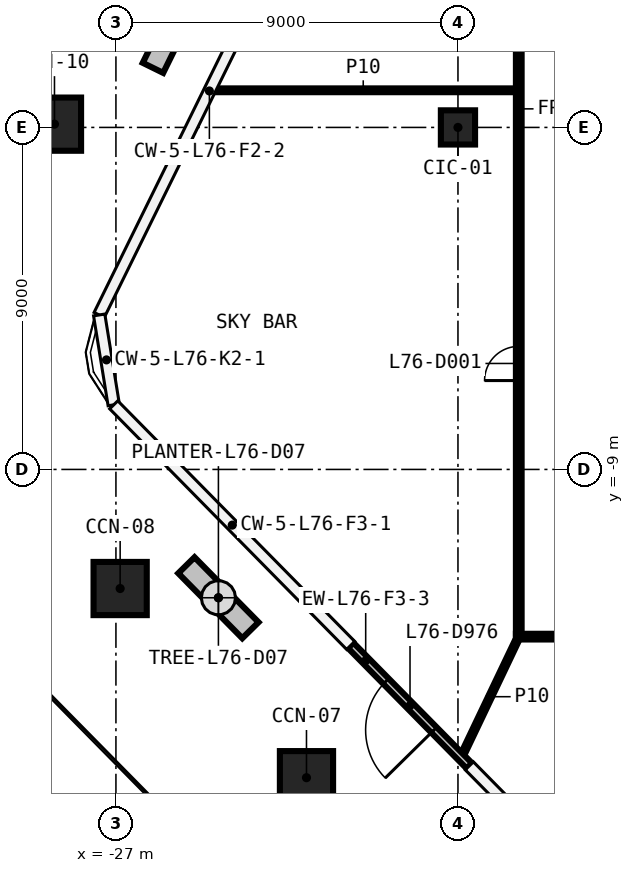
"""IFC4 building model, lengths in metres.
Left out: names, types, materials, properties, quantities, classifications, styles, units other than length and angle.
Written with IfcOpenShell. Run it as: python <this file> out.ifc"""

import sys

from ifc_helpers import new_model, si_unit, direction, frame, frame_2d, origin, origin_2d, place, context, subcontext, project, spatial, rectangle, hollow_rectangle, extrude, element, fill, save


model = new_model("IFC4")
c1 = context("Model", 3, precision=1e-05, world=origin(), true_north=direction((0.0, 1.0)))
c2 = subcontext(c1, "Body", "Model", "MODEL_VIEW")
j1 = project(units=[si_unit("LENGTHUNIT", "METRE"), si_unit("PLANEANGLEUNIT", "RADIAN")], contexts=[c1])
p1 = place(None, origin())
s1 = spatial("IfcSite", under=j1, at=p1, CompositionType="ELEMENT")
p2 = place(p1, origin())
s2 = spatial("IfcBuilding", under=s1, at=p2, CompositionType="ELEMENT")
p3 = place(p2, frame((0.0, 0.0, 353.0)))
s3 = spatial("IfcBuildingStorey", under=s2, at=p3, CompositionType="ELEMENT", Elevation=353.0)
p4 = place(p3, frame((-18.0, 0.0, 0.0), z_axis=(0.0, 0.0, 1.0), x_axis=(1.0, 0.0, 0.0)))
e1 = element("IfcColumn", 1, at=p4, inside=s3, PredefinedType="COLUMN", context=c2, shape_type="SweptSolid", body=[
    extrude(rectangle(XDim=0.9, YDim=0.9, at=origin_2d()), origin(), (0.0, 0.0, 1.0), 5.6),
])
for number, where, z_axis, x_axis in (
    (2, (-26.889, -12.134, 0.0), (0.0, 0.0, 1.0), (1.0, 0.0, 0.0)),
    (3, (-21.986, -17.112, 0.0), (0.0, 0.0, 1.0), (1.0, 0.0, 0.0)),
    (4, (-28.617, 0.086, 0.0), (0.0, 0.0, 1.0), (1.0, 0.0, 0.0)),
):
    element("IfcColumn", number, at=place(p3, frame(where, z_axis=z_axis, x_axis=x_axis)), inside=s3, PredefinedType="COLUMN", context=c2, shape_type="SweptSolid", body=[
        extrude(hollow_rectangle(XDim=1.4, YDim=1.4, WallThickness=0.06, at=origin_2d()), origin(), (0.0, 0.0, 1.0), 6.0),
    ])
p5 = place(p3, frame((16.475, -13.4, 0.0), z_axis=(0.0, 0.0, 1.0), x_axis=(-1.0, 0.0, 0.0)))
e5 = element("IfcWall", 5, at=p5, inside=s3, PredefinedType="PARTITIONING", context=c2, shape_type="SweptSolid", body=[
    extrude(rectangle(XDim=32.95, YDim=0.15, at=frame_2d((16.475, 0.0))), origin(), (0.0, 0.0, 1.0), 5.6),
])
p6 = place(p5, frame((16.809, 0.0, 0.0)))
e6 = element("IfcOpeningElement", 6, at=p6, cuts=e5, PredefinedType="OPENING", context=c2, shape_type="SweptSolid", body=[
    extrude(rectangle(XDim=0.9, YDim=2.1, at=frame_2d((0.45, 1.05))), frame((0.0, 0.085, 0.0), z_axis=(0.0, -1.0, 0.0), x_axis=(1.0, 0.0, 0.0)), (0.0, 0.0, 1.0), 0.17),
])
p7 = place(p5, frame((1.542, 0.0, 0.0)))
e7 = element("IfcOpeningElement", 7, at=p7, cuts=e5, PredefinedType="OPENING", context=c2, shape_type="SweptSolid", body=[
    extrude(rectangle(XDim=0.9, YDim=2.1, at=frame_2d((0.45, 1.05))), frame((0.0, 0.085, 0.0), z_axis=(0.0, -1.0, 0.0), x_axis=(1.0, 0.0, 0.0)), (0.0, 0.0, 1.0), 0.17),
])
p8 = place(p3, frame((-24.51, 0.977, 0.0), z_axis=(0.0, 0.0, 1.0), x_axis=(1.0, 0.0, 0.0)))
e8 = element("IfcWall", 8, at=p8, inside=s3, PredefinedType="PARTITIONING", context=c2, shape_type="SweptSolid", body=[
    extrude(rectangle(XDim=8.035, YDim=0.1, at=frame_2d((4.018, 0.0))), origin(), (0.0, 0.0, 1.0), 5.6),
])
p9 = place(p3, frame((-17.908, -16.561, 0.0), z_axis=(0.0, 0.0, 1.0), x_axis=(0.430658615436, 0.902514906775, 0.0)))
e9 = element("IfcWall", 9, at=p9, inside=s3, PredefinedType="PARTITIONING", context=c2, shape_type="SweptSolid", body=[
    extrude(rectangle(XDim=3.502, YDim=0.1, at=frame_2d((1.751, 0.0))), origin(), (0.0, 0.0, 1.0), 5.6),
])
p10 = place(p3, frame((-16.4, -13.325, 0.0), z_axis=(0.0, 0.0, 1.0), x_axis=(0.0, 1.0, 0.0)))
e10 = element("IfcWall", 10, at=p10, inside=s3, PredefinedType="PARTITIONING", context=c2, shape_type="SweptSolid", body=[
    extrude(rectangle(XDim=26.65, YDim=0.15, at=frame_2d((13.325, 0.0))), origin(), (0.0, 0.0, 1.0), 5.6),
])
p11 = place(p10, frame((6.664, 0.0, 0.0)))
e11 = element("IfcOpeningElement", 11, at=p11, cuts=e10, PredefinedType="OPENING", context=c2, shape_type="SweptSolid", body=[
    extrude(rectangle(XDim=0.9, YDim=2.1, at=frame_2d((0.45, 1.05))), frame((0.0, 0.085, 0.0), z_axis=(0.0, -1.0, 0.0), x_axis=(1.0, 0.0, 0.0)), (0.0, 0.0, 1.0), 0.17),
])
p12 = place(p10, frame((20.063, 0.0, 0.0)))
e12 = element("IfcOpeningElement", 12, at=p12, cuts=e10, PredefinedType="OPENING", context=c2, shape_type="SweptSolid", body=[
    extrude(rectangle(XDim=0.9, YDim=2.1, at=frame_2d((0.45, 1.05))), frame((0.0, 0.085, 0.0), z_axis=(0.0, -1.0, 0.0), x_axis=(1.0, 0.0, 0.0)), (0.0, 0.0, 1.0), 0.17),
])
p13 = place(p3, frame((-17.701, -16.8, 0.0), z_axis=(0.0, 0.0, 1.0), x_axis=(-0.701707571783, 0.712465075426, 0.0)))
e13 = element("IfcWall", 13, at=p13, inside=s3, PredefinedType="SOLIDWALL", context=c2, shape_type="SweptSolid", body=[
    extrude(rectangle(XDim=4.448, YDim=0.2, at=frame_2d((2.224, 0.0))), origin(), (0.0, 0.0, 1.0), 5.6),
])
p14 = place(p13, frame((1.324, 0.0, 0.0)))
e14 = element("IfcOpeningElement", 14, at=p14, cuts=e13, PredefinedType="OPENING", context=c2, shape_type="SweptSolid", body=[
    extrude(rectangle(XDim=1.8, YDim=2.4, at=frame_2d((0.9, 1.2))), frame((0.0, 0.11, 0.0), z_axis=(0.0, -1.0, 0.0), x_axis=(1.0, 0.0, 0.0)), (0.0, 0.0, 1.0), 0.22),
])
for number, where, z_axis, x_axis in (
    (15, (-24.966, 3.721, 0.0), (0.0, 0.0, 1.0), (-0.441, -0.897, 0.0)),
    (16, (-25.146, -11.522, 0.0), (0.0, 0.0, 1.0), (0.702, -0.712, 0.0)),
):
    element("IfcWall", number, at=place(p3, frame(where, z_axis=z_axis, x_axis=x_axis)), inside=s3, PredefinedType="SOLIDWALL", context=c2, shape_type="SweptSolid", body=[
        extrude(rectangle(XDim=2.4, YDim=0.6, at=frame_2d((1.2, 0.0))), origin(), (0.0, 0.0, 1.0), 0.42),
    ])
p15 = place(p11, origin())
e17 = element("IfcDoor", 17, at=p15, inside=s3, OperationType="SINGLE_SWING_RIGHT", PredefinedType="DOOR", context=c2, shape_type="SweptSolid", body=[
    extrude(rectangle(XDim=0.9, YDim=2.1, at=frame_2d((0.45, 1.05))), frame((0.0, 0.025, 0.0), z_axis=(0.0, -1.0, 0.0), x_axis=(1.0, 0.0, 0.0)), (0.0, 0.0, 1.0), 0.05),
])
fill(e11, e17)
p16 = place(p14, origin())
e18 = element("IfcDoor", 18, at=p16, inside=s3, OperationType="SINGLE_SWING_LEFT", PredefinedType="DOOR", context=c2, shape_type="SweptSolid", body=[
    extrude(rectangle(XDim=1.8, YDim=2.4, at=frame_2d((0.9, 1.2))), frame((0.0, 0.025, 0.0), z_axis=(0.0, -1.0, 0.0), x_axis=(1.0, 0.0, 0.0)), (0.0, 0.0, 1.0), 0.05),
])
fill(e14, e18)
save(model, sys.argv[1])
